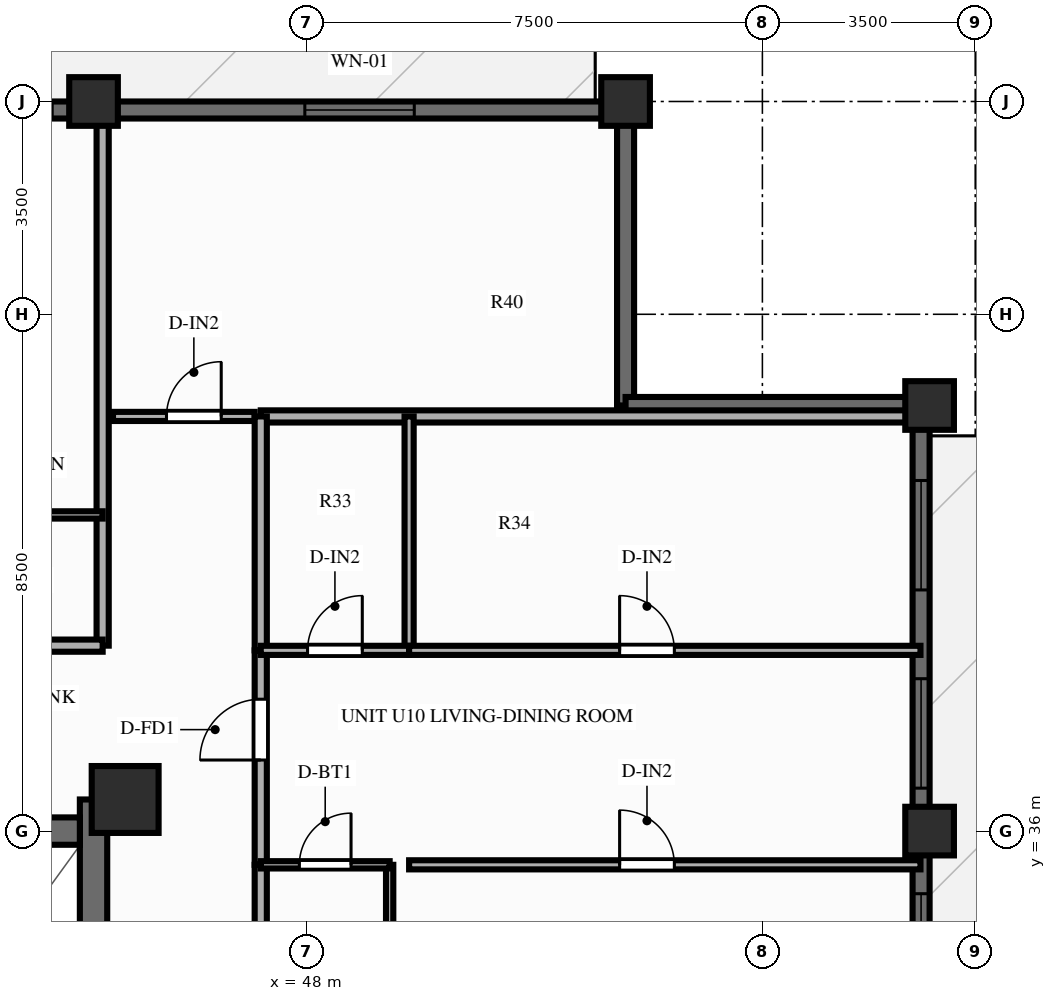
"""IFC4 building model, lengths in metres.
Left out: names, types, materials, properties, quantities, classifications, styles, units other than length and angle.
Written with IfcOpenShell. Run it as: python <this file> out.ifc"""

import sys

from ifc_helpers import new_model, si_unit, direction, frame, frame_2d, origin, origin_2d, place, context, subcontext, project, spatial, rectangle, extrude, source, transform, mapped, element, fill, save


model = new_model("IFC4")
c1 = context("Model", 3, precision=1e-05, world=origin(), true_north=direction((0.0, 1.0)))
c2 = subcontext(c1, "Body", "Model", "MODEL_VIEW")
j1 = project(units=[si_unit("LENGTHUNIT", "METRE"), si_unit("PLANEANGLEUNIT", "RADIAN")], contexts=[c1])
p1 = place(None, origin())
s1 = spatial("IfcSite", under=j1, at=p1, CompositionType="ELEMENT")
p2 = place(p1, origin())
s2 = spatial("IfcBuilding", under=s1, at=p2, CompositionType="ELEMENT")
p3 = place(p2, frame((0.0, 0.0, 182.8)))
s3 = spatial("IfcBuildingStorey", under=s2, at=p3, CompositionType="ELEMENT", Elevation=182.8)
p4 = place(p3, frame((44.5, 17.48, 0.0), z_axis=(0.0, 0.0, 1.0), x_axis=(0.0, 1.0, 0.0)))
e1 = element("IfcWall", 1, at=p4, inside=s3, PredefinedType="SHEAR", context=c2, shape_type="SweptSolid", body=[
    extrude(rectangle(XDim=19.04, YDim=0.45, at=frame_2d((9.52, 0.0))), origin(), (0.0, 0.0, 1.0), 3.9),
])
p5 = place(p4, frame((12.67, 0.0, 0.0), z_axis=(0.0, 0.0, 1.0), x_axis=(-1.0, 0.0, 0.0)))
e2 = element("IfcOpeningElement", 2, at=p5, cuts=e1, PredefinedType="OPENING", context=c2, shape_type="SweptSolid", body=[
    extrude(rectangle(XDim=1.1, YDim=2.15, at=frame_2d((0.55, 1.075))), frame((0.0, 0.237, 0.0), z_axis=(0.0, -1.0, 0.0), x_axis=(1.0, 0.0, 0.0)), (0.0, 0.0, 1.0), 0.474),
])
p6 = place(p3, frame((31.725, 36.0, 0.0), z_axis=(0.0, 0.0, 1.0), x_axis=(1.0, 0.0, 0.0)))
e3 = element("IfcWall", 3, at=p6, inside=s3, PredefinedType="SHEAR", context=c2, shape_type="SweptSolid", body=[
    extrude(rectangle(XDim=12.55, YDim=0.45, at=frame_2d((6.275, 0.0))), origin(), (0.0, 0.0, 1.0), 3.9),
])
p7 = place(p6, frame((5.225, 0.0, 0.0), z_axis=(0.0, 0.0, 1.0), x_axis=(-1.0, 0.0, 0.0)))
e4 = element("IfcOpeningElement", 4, at=p7, cuts=e3, PredefinedType="OPENING", context=c2, shape_type="SweptSolid", body=[
    extrude(rectangle(XDim=1.4, YDim=2.15, at=frame_2d((0.7, 1.075))), frame((0.0, 0.237, 0.0), z_axis=(0.0, -1.0, 0.0), x_axis=(1.0, 0.0, 0.0)), (0.0, 0.0, 1.0), 0.474),
])
m1 = source(origin(), c2, "Body", "SweptSolid", [
    extrude(rectangle(XDim=1.1, YDim=1.1, at=origin_2d()), origin(), (0.0, 0.0, 1.0), 3.9),
])
p8 = place(p3, frame((45.02, 36.52, 0.0), z_axis=(0.0, 0.0, 1.0), x_axis=(1.0, 0.0, 0.0)))
e5 = element("IfcColumn", 5, at=p8, inside=s3, PredefinedType="COLUMN", context=c2, shape_type="MappedRepresentation", body=[
    mapped(m1, transform((0.0, 0.0, 0.0), scale=1.0)),
])
m2 = source(origin(), c2, "Body", "SweptSolid", [
    extrude(rectangle(XDim=0.8, YDim=0.8, at=origin_2d()), origin(), (0.0, 0.0, 1.0), 3.9),
])
for number, where, z_axis, x_axis in (
    (6, (58.25, 36.0, 0.0), (0.0, 0.0, 1.0), (1.0, 0.0, 0.0)),
    (7, (58.25, 43.0, 0.0), (0.0, 0.0, 1.0), (1.0, 0.0, 0.0)),
    (8, (53.25, 48.0, 0.0), (0.0, 0.0, 1.0), (1.0, 0.0, 0.0)),
    (9, (44.5, 48.0, 0.0), (0.0, 0.0, 1.0), (1.0, 0.0, 0.0)),
):
    element("IfcColumn", number, at=place(p3, frame(where, z_axis=z_axis, x_axis=x_axis)), inside=s3, PredefinedType="COLUMN", context=c2, shape_type="MappedRepresentation", body=[
        mapped(m2, transform((0.0, 0.0, 0.0), scale=1.0)),
    ])
p9 = place(p3, frame((22.75, 47.86, 0.0), z_axis=(0.0, 0.0, 1.0), x_axis=(1.0, 0.0, 0.0)))
e10 = element("IfcWall", 10, at=p9, inside=s3, PredefinedType="SOLIDWALL", context=c2, shape_type="SweptSolid", body=[
    extrude(rectangle(XDim=30.5, YDim=0.28, at=frame_2d((15.25, 0.0))), origin(), (0.0, 0.0, 1.0), 2.79),
])
p10 = place(p9, frame((3.825, 0.0, 0.0)))
e11 = element("IfcOpeningElement", 11, at=p10, cuts=e10, PredefinedType="OPENING", context=c2, shape_type="SweptSolid", body=[
    extrude(rectangle(XDim=1.1, YDim=2.15, at=frame_2d((0.55, 1.075))), frame((0.0, 0.152, 0.0), z_axis=(0.0, -1.0, 0.0), x_axis=(1.0, 0.0, 0.0)), (0.0, 0.0, 1.0), 0.304),
])
p11 = place(p9, frame((9.395, 0.0, 0.85)))
e12 = element("IfcOpeningElement", 12, at=p11, cuts=e10, PredefinedType="OPENING", context=c2, shape_type="SweptSolid", body=[
    extrude(rectangle(XDim=0.95, YDim=1.5, at=frame_2d((0.475, 0.75))), frame((0.0, 0.152, 0.0), z_axis=(0.0, -1.0, 0.0), x_axis=(1.0, 0.0, 0.0)), (0.0, 0.0, 1.0), 0.304),
])
p12 = place(p9, frame((11.18, 0.0, 0.85)))
e13 = element("IfcOpeningElement", 13, at=p12, cuts=e10, PredefinedType="OPENING", context=c2, shape_type="SweptSolid", body=[
    extrude(rectangle(XDim=1.5, YDim=1.65, at=frame_2d((0.75, 0.825))), frame((0.0, 0.152, 0.0), z_axis=(0.0, -1.0, 0.0), x_axis=(1.0, 0.0, 0.0)), (0.0, 0.0, 1.0), 0.304),
])
p13 = place(p9, frame((13.594, 0.0, 0.85)))
e14 = element("IfcOpeningElement", 14, at=p13, cuts=e10, PredefinedType="OPENING", context=c2, shape_type="SweptSolid", body=[
    extrude(rectangle(XDim=1.8, YDim=1.65, at=frame_2d((0.9, 0.825))), frame((0.0, 0.152, 0.0), z_axis=(0.0, -1.0, 0.0), x_axis=(1.0, 0.0, 0.0)), (0.0, 0.0, 1.0), 0.304),
])
p14 = place(p9, frame((16.604, 0.0, 0.85)))
e15 = element("IfcOpeningElement", 15, at=p14, cuts=e10, PredefinedType="OPENING", context=c2, shape_type="SweptSolid", body=[
    extrude(rectangle(XDim=1.8, YDim=1.65, at=frame_2d((0.9, 0.825))), frame((0.0, 0.152, 0.0), z_axis=(0.0, -1.0, 0.0), x_axis=(1.0, 0.0, 0.0)), (0.0, 0.0, 1.0), 0.304),
])
p15 = place(p9, frame((19.57, 0.0, 0.85)))
e16 = element("IfcOpeningElement", 16, at=p15, cuts=e10, PredefinedType="OPENING", context=c2, shape_type="SweptSolid", body=[
    extrude(rectangle(XDim=1.5, YDim=1.65, at=frame_2d((0.75, 0.825))), frame((0.0, 0.152, 0.0), z_axis=(0.0, -1.0, 0.0), x_axis=(1.0, 0.0, 0.0)), (0.0, 0.0, 1.0), 0.304),
])
p16 = place(p9, frame((25.225, 0.0, 0.85)))
e17 = element("IfcOpeningElement", 17, at=p16, cuts=e10, PredefinedType="OPENING", context=c2, shape_type="SweptSolid", body=[
    extrude(rectangle(XDim=1.8, YDim=1.65, at=frame_2d((0.9, 0.825))), frame((0.0, 0.152, 0.0), z_axis=(0.0, -1.0, 0.0), x_axis=(1.0, 0.0, 0.0)), (0.0, 0.0, 1.0), 0.304),
])
p17 = place(p3, frame((58.11, 11.0, 0.0), z_axis=(0.0, 0.0, 1.0), x_axis=(0.0, 1.0, 0.0)))
e18 = element("IfcWall", 18, at=p17, inside=s3, PredefinedType="SOLIDWALL", context=c2, shape_type="SweptSolid", body=[
    extrude(rectangle(XDim=32.0, YDim=0.28, at=frame_2d((16.0, 0.0))), origin(), (0.0, 0.0, 1.0), 2.79),
])
p18 = place(p17, frame((0.75, 0.0, 0.85)))
e19 = element("IfcOpeningElement", 19, at=p18, cuts=e18, PredefinedType="OPENING", context=c2, shape_type="SweptSolid", body=[
    extrude(rectangle(XDim=1.8, YDim=1.65, at=frame_2d((0.9, 0.825))), frame((0.0, 0.152, 0.0), z_axis=(0.0, -1.0, 0.0), x_axis=(1.0, 0.0, 0.0)), (0.0, 0.0, 1.0), 0.304),
])
p19 = place(p17, frame((4.01, 0.0, 0.85)))
e20 = element("IfcOpeningElement", 20, at=p19, cuts=e18, PredefinedType="OPENING", context=c2, shape_type="SweptSolid", body=[
    extrude(rectangle(XDim=1.8, YDim=1.65, at=frame_2d((0.9, 0.825))), frame((0.0, 0.152, 0.0), z_axis=(0.0, -1.0, 0.0), x_axis=(1.0, 0.0, 0.0)), (0.0, 0.0, 1.0), 0.304),
])
p20 = place(p17, frame((8.582, 0.0, 0.85)))
e21 = element("IfcOpeningElement", 21, at=p20, cuts=e18, PredefinedType="OPENING", context=c2, shape_type="SweptSolid", body=[
    extrude(rectangle(XDim=1.8, YDim=1.65, at=frame_2d((0.9, 0.825))), frame((0.0, 0.152, 0.0), z_axis=(0.0, -1.0, 0.0), x_axis=(1.0, 0.0, 0.0)), (0.0, 0.0, 1.0), 0.304),
])
p21 = place(p17, frame((11.729, 0.0, 0.85)))
e22 = element("IfcOpeningElement", 22, at=p21, cuts=e18, PredefinedType="OPENING", context=c2, shape_type="SweptSolid", body=[
    extrude(rectangle(XDim=1.8, YDim=1.65, at=frame_2d((0.9, 0.825))), frame((0.0, 0.152, 0.0), z_axis=(0.0, -1.0, 0.0), x_axis=(1.0, 0.0, 0.0)), (0.0, 0.0, 1.0), 0.304),
])
p22 = place(p17, frame((16.718, 0.0, 0.0), z_axis=(0.0, 0.0, 1.0), x_axis=(-1.0, 0.0, 0.0)))
e23 = element("IfcOpeningElement", 23, at=p22, cuts=e18, PredefinedType="OPENING", context=c2, shape_type="SweptSolid", body=[
    extrude(rectangle(XDim=1.6, YDim=2.15, at=frame_2d((0.8, 1.075))), frame((0.0, 0.152, 0.0), z_axis=(0.0, -1.0, 0.0), x_axis=(1.0, 0.0, 0.0)), (0.0, 0.0, 1.0), 0.304),
])
p23 = place(p17, frame((18.863, 0.0, 0.85)))
e24 = element("IfcOpeningElement", 24, at=p23, cuts=e18, PredefinedType="OPENING", context=c2, shape_type="SweptSolid", body=[
    extrude(rectangle(XDim=1.8, YDim=1.65, at=frame_2d((0.9, 0.825))), frame((0.0, 0.152, 0.0), z_axis=(0.0, -1.0, 0.0), x_axis=(1.0, 0.0, 0.0)), (0.0, 0.0, 1.0), 0.304),
])
p24 = place(p17, frame((22.17, 0.0, 0.85)))
e25 = element("IfcOpeningElement", 25, at=p24, cuts=e18, PredefinedType="OPENING", context=c2, shape_type="SweptSolid", body=[
    extrude(rectangle(XDim=1.8, YDim=1.65, at=frame_2d((0.9, 0.825))), frame((0.0, 0.152, 0.0), z_axis=(0.0, -1.0, 0.0), x_axis=(1.0, 0.0, 0.0)), (0.0, 0.0, 1.0), 0.304),
])
p25 = place(p17, frame((25.706, 0.0, 0.85)))
e26 = element("IfcOpeningElement", 26, at=p25, cuts=e18, PredefinedType="OPENING", context=c2, shape_type="SweptSolid", body=[
    extrude(rectangle(XDim=1.8, YDim=1.65, at=frame_2d((0.9, 0.825))), frame((0.0, 0.152, 0.0), z_axis=(0.0, -1.0, 0.0), x_axis=(1.0, 0.0, 0.0)), (0.0, 0.0, 1.0), 0.304),
])
p26 = place(p17, frame((28.966, 0.0, 0.85)))
e27 = element("IfcOpeningElement", 27, at=p26, cuts=e18, PredefinedType="OPENING", context=c2, shape_type="SweptSolid", body=[
    extrude(rectangle(XDim=1.8, YDim=1.65, at=frame_2d((0.9, 0.825))), frame((0.0, 0.152, 0.0), z_axis=(0.0, -1.0, 0.0), x_axis=(1.0, 0.0, 0.0)), (0.0, 0.0, 1.0), 0.304),
])
for number, where, z_axis, x_axis in (
    (28, (53.25, 43.0, 0.0), (0.0, 0.0, 1.0), (0.0, 1.0, 0.0)),
    (29, (53.25, 43.0, 0.0), (0.0, 0.0, 1.0), (1.0, 0.0, 0.0)),
):
    element("IfcWall", number, at=place(p3, frame(where, z_axis=z_axis, x_axis=x_axis)), inside=s3, PredefinedType="SOLIDWALL", context=c2, shape_type="SweptSolid", body=[
        extrude(rectangle(XDim=4.92, YDim=0.28, at=frame_2d((2.46, 0.0))), origin(), (0.0, 0.0, 1.0), 2.79),
    ])
p27 = place(p3, frame((44.82, 42.82, 0.0), z_axis=(0.0, 0.0, 1.0), x_axis=(1.0, 0.0, 0.0)))
e30 = element("IfcWall", 30, at=p27, inside=s3, PredefinedType="PARTITIONING", context=c2, shape_type="SweptSolid", body=[
    extrude(rectangle(XDim=2.33, YDim=0.15, at=frame_2d((1.165, 0.0))), origin(), (0.0, 0.0, 1.0), 3.69),
])
p28 = place(p27, frame((0.88, 0.0, 0.0)))
e31 = element("IfcOpeningElement", 31, at=p28, cuts=e30, PredefinedType="OPENING", context=c2, shape_type="SweptSolid", body=[
    extrude(rectangle(XDim=0.9, YDim=2.1, at=frame_2d((0.45, 1.05))), frame((0.0, 0.087, 0.0), z_axis=(0.0, -1.0, 0.0), x_axis=(1.0, 0.0, 0.0)), (0.0, 0.0, 1.0), 0.174),
])
p29 = place(p3, frame((44.65, 39.05, 0.0), z_axis=(0.0, 0.0, 1.0), x_axis=(0.0, 1.0, 0.0)))
e32 = element("IfcWall", 32, at=p29, inside=s3, PredefinedType="PARTITIONING", context=c2, shape_type="SweptSolid", body=[
    extrude(rectangle(XDim=8.8, YDim=0.2, at=frame_2d((4.4, 0.0))), origin(), (0.0, 0.0, 1.0), 2.79),
])
p30 = place(p3, frame((41.88, 39.05, 0.0), z_axis=(0.0, 0.0, 1.0), x_axis=(1.0, 0.0, 0.0)))
e33 = element("IfcWall", 33, at=p30, inside=s3, PredefinedType="PARTITIONING", context=c2, shape_type="SweptSolid", body=[
    extrude(rectangle(XDim=2.77, YDim=0.2, at=frame_2d((1.385, 0.0))), origin(), (0.0, 0.0, 1.0), 3.69),
])
p31 = place(p3, frame((41.88, 41.2, 0.0), z_axis=(0.0, 0.0, 1.0), x_axis=(1.0, 0.0, 0.0)))
e34 = element("IfcWall", 34, at=p31, inside=s3, PredefinedType="PARTITIONING", context=c2, shape_type="SweptSolid", body=[
    extrude(rectangle(XDim=2.77, YDim=0.12, at=frame_2d((1.385, 0.0))), origin(), (0.0, 0.0, 1.0), 3.69),
])
p32 = place(p3, frame((47.25, 42.82, 0.0), z_axis=(0.0, 0.0, 1.0), x_axis=(1.0, 0.0, 0.0)))
e35 = element("IfcWall", 35, at=p32, inside=s3, PredefinedType="PARTITIONING", context=c2, shape_type="SweptSolid", body=[
    extrude(rectangle(XDim=10.85, YDim=0.2, at=frame_2d((5.425, 0.0))), origin(), (0.0, 0.0, 1.0), 3.69),
])
p33 = place(p3, frame((47.25, 32.695, 0.0), z_axis=(0.0, 0.0, 1.0), x_axis=(0.0, 1.0, 0.0)))
e36 = element("IfcWall", 36, at=p33, inside=s3, PredefinedType="PARTITIONING", context=c2, shape_type="SweptSolid", body=[
    extrude(rectangle(XDim=2.75, YDim=0.2, at=frame_2d((1.375, 0.0))), origin(), (0.0, 0.0, 1.0), 3.69),
])
p34 = place(p3, frame((47.25, 35.445, 0.0), z_axis=(0.0, 0.0, 1.0), x_axis=(0.0, 1.0, 0.0)))
e37 = element("IfcWall", 37, at=p34, inside=s3, PredefinedType="PARTITIONING", context=c2, shape_type="SweptSolid", body=[
    extrude(rectangle(XDim=3.527, YDim=0.2, at=frame_2d((1.764, 0.0))), origin(), (0.0, 0.0, 1.0), 3.69),
])
p35 = place(p34, frame((1.724, 0.0, 0.0)))
e38 = element("IfcOpeningElement", 38, at=p35, cuts=e37, PredefinedType="OPENING", context=c2, shape_type="SweptSolid", body=[
    extrude(rectangle(XDim=1.0, YDim=2.15, at=frame_2d((0.5, 1.075))), frame((0.0, 0.112, 0.0), z_axis=(0.0, -1.0, 0.0), x_axis=(1.0, 0.0, 0.0)), (0.0, 0.0, 1.0), 0.224),
])
p36 = place(p3, frame((47.25, 38.973, 0.0), z_axis=(0.0, 0.0, 1.0), x_axis=(0.0, 1.0, 0.0)))
e39 = element("IfcWall", 39, at=p36, inside=s3, PredefinedType="PARTITIONING", context=c2, shape_type="SweptSolid", body=[
    extrude(rectangle(XDim=3.847, YDim=0.2, at=frame_2d((1.924, 0.0))), origin(), (0.0, 0.0, 1.0), 3.69),
])
p37 = place(p3, frame((49.37, 32.695, 0.0), z_axis=(0.0, 0.0, 1.0), x_axis=(0.0, 1.0, 0.0)))
e40 = element("IfcWall", 40, at=p37, inside=s3, PredefinedType="PARTITIONING", context=c2, shape_type="SweptSolid", body=[
    extrude(rectangle(XDim=2.75, YDim=0.12, at=frame_2d((1.375, 0.0))), origin(), (0.0, 0.0, 1.0), 3.69),
])
p38 = place(p3, frame((49.69, 38.973, 0.0), z_axis=(0.0, 0.0, 1.0), x_axis=(0.0, 1.0, 0.0)))
e41 = element("IfcWall", 41, at=p38, inside=s3, PredefinedType="PARTITIONING", context=c2, shape_type="SweptSolid", body=[
    extrude(rectangle(XDim=3.847, YDim=0.15, at=frame_2d((1.924, 0.0))), origin(), (0.0, 0.0, 1.0), 3.69),
])
p39 = place(p3, frame((47.25, 35.445, 0.0), z_axis=(0.0, 0.0, 1.0), x_axis=(1.0, 0.0, 0.0)))
e42 = element("IfcWall", 42, at=p39, inside=s3, PredefinedType="PARTITIONING", context=c2, shape_type="SweptSolid", body=[
    extrude(rectangle(XDim=2.12, YDim=0.12, at=frame_2d((1.06, 0.0))), origin(), (0.0, 0.0, 1.0), 3.69),
])
p40 = place(p39, frame((0.635, 0.0, 0.0)))
e43 = element("IfcOpeningElement", 43, at=p40, cuts=e42, PredefinedType="OPENING", context=c2, shape_type="SweptSolid", body=[
    extrude(rectangle(XDim=0.85, YDim=2.05, at=frame_2d((0.425, 1.025))), frame((0.0, 0.072, 0.0), z_axis=(0.0, -1.0, 0.0), x_axis=(1.0, 0.0, 0.0)), (0.0, 0.0, 1.0), 0.144),
])
p41 = place(p3, frame((49.69, 35.445, 0.0), z_axis=(0.0, 0.0, 1.0), x_axis=(1.0, 0.0, 0.0)))
e44 = element("IfcWall", 44, at=p41, inside=s3, PredefinedType="PARTITIONING", context=c2, shape_type="SweptSolid", body=[
    extrude(rectangle(XDim=8.41, YDim=0.15, at=frame_2d((4.205, 0.0))), origin(), (0.0, 0.0, 1.0), 3.69),
])
p42 = place(p41, frame((3.462, 0.0, 0.0)))
e45 = element("IfcOpeningElement", 45, at=p42, cuts=e44, PredefinedType="OPENING", context=c2, shape_type="SweptSolid", body=[
    extrude(rectangle(XDim=0.9, YDim=2.1, at=frame_2d((0.45, 1.05))), frame((0.0, 0.087, 0.0), z_axis=(0.0, -1.0, 0.0), x_axis=(1.0, 0.0, 0.0)), (0.0, 0.0, 1.0), 0.174),
])
p43 = place(p3, frame((47.25, 38.973, 0.0), z_axis=(0.0, 0.0, 1.0), x_axis=(1.0, 0.0, 0.0)))
e46 = element("IfcWall", 46, at=p43, inside=s3, PredefinedType="PARTITIONING", context=c2, shape_type="SweptSolid", body=[
    extrude(rectangle(XDim=2.44, YDim=0.15, at=frame_2d((1.22, 0.0))), origin(), (0.0, 0.0, 1.0), 3.69),
])
p44 = place(p43, frame((0.77, 0.0, 0.0)))
e47 = element("IfcOpeningElement", 47, at=p44, cuts=e46, PredefinedType="OPENING", context=c2, shape_type="SweptSolid", body=[
    extrude(rectangle(XDim=0.9, YDim=2.1, at=frame_2d((0.45, 1.05))), frame((0.0, 0.087, 0.0), z_axis=(0.0, -1.0, 0.0), x_axis=(1.0, 0.0, 0.0)), (0.0, 0.0, 1.0), 0.174),
])
p45 = place(p3, frame((49.69, 38.973, 0.0), z_axis=(0.0, 0.0, 1.0), x_axis=(1.0, 0.0, 0.0)))
e48 = element("IfcWall", 48, at=p45, inside=s3, PredefinedType="PARTITIONING", context=c2, shape_type="SweptSolid", body=[
    extrude(rectangle(XDim=8.41, YDim=0.15, at=frame_2d((4.205, 0.0))), origin(), (0.0, 0.0, 1.0), 3.69),
])
p46 = place(p45, frame((3.462, 0.0, 0.0)))
e49 = element("IfcOpeningElement", 49, at=p46, cuts=e48, PredefinedType="OPENING", context=c2, shape_type="SweptSolid", body=[
    extrude(rectangle(XDim=0.9, YDim=2.1, at=frame_2d((0.45, 1.05))), frame((0.0, 0.087, 0.0), z_axis=(0.0, -1.0, 0.0), x_axis=(1.0, 0.0, 0.0)), (0.0, 0.0, 1.0), 0.174),
])
m3 = source(origin(), c2, "Body", "SweptSolid", [
    extrude(rectangle(XDim=1.8, YDim=1.65, at=frame_2d((0.9, 0.825))), frame((0.0, 0.03, 0.0), z_axis=(0.0, -1.0, 0.0), x_axis=(1.0, 0.0, 0.0)), (0.0, 0.0, 1.0), 0.06),
])
p47 = place(p16, origin())
e50 = element("IfcWindow", 50, at=p47, inside=s3, PartitioningType="SINGLE_PANEL", PredefinedType="WINDOW", context=c2, shape_type="MappedRepresentation", body=[
    mapped(m3, transform((0.0, 0.0, 0.0), scale=1.0)),
])
fill(e17, e50)
p48 = place(p24, origin())
e51 = element("IfcWindow", 51, at=p48, inside=s3, PartitioningType="SINGLE_PANEL", PredefinedType="WINDOW", context=c2, shape_type="MappedRepresentation", body=[
    mapped(m3, transform((0.0, 0.0, 0.0), scale=1.0)),
])
fill(e25, e51)
p49 = place(p25, origin())
e52 = element("IfcWindow", 52, at=p49, inside=s3, PartitioningType="SINGLE_PANEL", PredefinedType="WINDOW", context=c2, shape_type="MappedRepresentation", body=[
    mapped(m3, transform((0.0, 0.0, 0.0), scale=1.0)),
])
fill(e26, e52)
p50 = place(p26, origin())
e53 = element("IfcWindow", 53, at=p50, inside=s3, PartitioningType="SINGLE_PANEL", PredefinedType="WINDOW", context=c2, shape_type="MappedRepresentation", body=[
    mapped(m3, transform((0.0, 0.0, 0.0), scale=1.0)),
])
fill(e27, e53)
m4 = source(origin(), c2, "Body", "SweptSolid", [
    extrude(rectangle(XDim=0.9, YDim=2.1, at=frame_2d((0.45, 1.05))), frame((0.0, 0.025, 0.0), z_axis=(0.0, -1.0, 0.0), x_axis=(1.0, 0.0, 0.0)), (0.0, 0.0, 1.0), 0.05),
])
p51 = place(p28, origin())
e54 = element("IfcDoor", 54, at=p51, inside=s3, OperationType="SINGLE_SWING_RIGHT", PredefinedType="DOOR", context=c2, shape_type="MappedRepresentation", body=[
    mapped(m4, transform((0.0, 0.0, 0.0), scale=1.0)),
])
fill(e31, e54)
m5 = source(origin(), c2, "Body", "SweptSolid", [
    extrude(rectangle(XDim=1.0, YDim=2.15, at=frame_2d((0.5, 1.075))), frame((0.0, 0.025, 0.0), z_axis=(0.0, -1.0, 0.0), x_axis=(1.0, 0.0, 0.0)), (0.0, 0.0, 1.0), 0.05),
])
p52 = place(p35, origin())
e55 = element("IfcDoor", 55, at=p52, inside=s3, OperationType="SINGLE_SWING_LEFT", PredefinedType="DOOR", context=c2, shape_type="MappedRepresentation", body=[
    mapped(m5, transform((0.0, 0.0, 0.0), scale=1.0)),
])
fill(e38, e55)
m6 = source(origin(), c2, "Body", "SweptSolid", [
    extrude(rectangle(XDim=0.85, YDim=2.05, at=frame_2d((0.425, 1.025))), frame((0.0, 0.025, 0.0), z_axis=(0.0, -1.0, 0.0), x_axis=(1.0, 0.0, 0.0)), (0.0, 0.0, 1.0), 0.05),
])
p53 = place(p40, origin())
e56 = element("IfcDoor", 56, at=p53, inside=s3, OperationType="SINGLE_SWING_RIGHT", PredefinedType="DOOR", context=c2, shape_type="MappedRepresentation", body=[
    mapped(m6, transform((0.0, 0.0, 0.0), scale=1.0)),
])
fill(e43, e56)
p54 = place(p42, origin())
e57 = element("IfcDoor", 57, at=p54, inside=s3, OperationType="SINGLE_SWING_LEFT", PredefinedType="DOOR", context=c2, shape_type="MappedRepresentation", body=[
    mapped(m4, transform((0.0, 0.0, 0.0), scale=1.0)),
])
fill(e45, e57)
p55 = place(p44, origin())
e58 = element("IfcDoor", 58, at=p55, inside=s3, OperationType="SINGLE_SWING_RIGHT", PredefinedType="DOOR", context=c2, shape_type="MappedRepresentation", body=[
    mapped(m4, transform((0.0, 0.0, 0.0), scale=1.0)),
])
fill(e47, e58)
p56 = place(p46, origin())
e59 = element("IfcDoor", 59, at=p56, inside=s3, OperationType="SINGLE_SWING_LEFT", PredefinedType="DOOR", context=c2, shape_type="MappedRepresentation", body=[
    mapped(m4, transform((0.0, 0.0, 0.0), scale=1.0)),
])
fill(e49, e59)
save(model, sys.argv[1])
